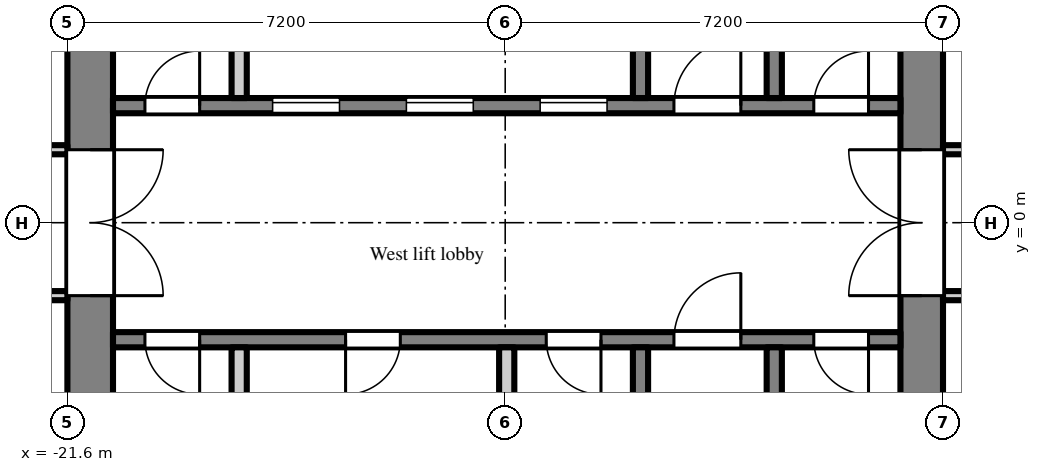
"""IFC4 building model, lengths in metres.
Left out: names, types, materials, properties, quantities, classifications, styles, units other than length and angle.
Written with IfcOpenShell. Run it as: python <this file> out.ifc"""

import sys

from ifc_helpers import new_model, si_unit, direction, frame, frame_2d, origin, place, context, subcontext, project, spatial, rectangle, extrude, element, fill, save


model = new_model("IFC4")
c1 = context("Model", 3, precision=1e-05, world=origin(), true_north=direction((0.0, 1.0)))
c2 = subcontext(c1, "Body", "Model", "MODEL_VIEW")
j1 = project(units=[si_unit("LENGTHUNIT", "METRE"), si_unit("PLANEANGLEUNIT", "RADIAN")], contexts=[c1])
p1 = place(None, origin())
s1 = spatial("IfcSite", under=j1, at=p1, CompositionType="ELEMENT")
p2 = place(p1, origin())
s2 = spatial("IfcBuilding", under=s1, at=p2, CompositionType="ELEMENT")
p3 = place(p2, frame((0.0, 0.0, 179.7)))
s3 = spatial("IfcBuildingStorey", under=s2, at=p3, CompositionType="ELEMENT", Elevation=179.7)
p4 = place(p3, frame((-7.55, -7.2, 0.0), z_axis=(0.0, 0.0, 1.0), x_axis=(0.0, 1.0, 0.0)))
e1 = element("IfcWall", 1, at=p4, inside=s3, PredefinedType="SHEAR", context=c2, shape_type="SweptSolid", body=[
    extrude(rectangle(XDim=14.4, YDim=0.7, at=frame_2d((7.2, 0.0))), origin(), (0.0, 0.0, 1.0), 2.6),
])
p5 = place(p4, frame((6.0, 0.0, 0.0)))
e2 = element("IfcOpeningElement", 2, at=p5, cuts=e1, PredefinedType="OPENING", context=c2, shape_type="SweptSolid", body=[
    extrude(rectangle(XDim=2.4, YDim=2.2, at=frame_2d((1.2, 1.1))), frame((0.0, 0.36, 0.0), z_axis=(0.0, -1.0, 0.0), x_axis=(1.0, 0.0, 0.0)), (0.0, 0.0, 1.0), 0.72),
])
p6 = place(p3, frame((-21.225, -7.2, 0.0), z_axis=(0.0, 0.0, 1.0), x_axis=(0.0, 1.0, 0.0)))
e3 = element("IfcWall", 3, at=p6, inside=s3, PredefinedType="SHEAR", context=c2, shape_type="SweptSolid", body=[
    extrude(rectangle(XDim=14.4, YDim=0.75, at=frame_2d((7.2, 0.0))), origin(), (0.0, 0.0, 1.0), 2.6),
])
p7 = place(p6, frame((6.0, 0.0, 0.0)))
e4 = element("IfcOpeningElement", 4, at=p7, cuts=e3, PredefinedType="OPENING", context=c2, shape_type="SweptSolid", body=[
    extrude(rectangle(XDim=2.4, YDim=2.2, at=frame_2d((1.2, 1.1))), frame((0.0, 0.385, 0.0), z_axis=(0.0, -1.0, 0.0), x_axis=(1.0, 0.0, 0.0)), (0.0, 0.0, 1.0), 0.77),
])
p8 = place(p3, frame((-7.9, 1.925, 0.0), z_axis=(0.0, 0.0, 1.0), x_axis=(-1.0, 0.0, 0.0)))
e5 = element("IfcWall", 5, at=p8, inside=s3, PredefinedType="SHEAR", context=c2, shape_type="SweptSolid", body=[
    extrude(rectangle(XDim=12.95, YDim=0.25, at=frame_2d((6.475, 0.0))), origin(), (0.0, 0.0, 1.0), 2.6),
])
p9 = place(p8, frame((4.825, 0.0, 0.0)))
e6 = element("IfcOpeningElement", 6, at=p9, cuts=e5, PredefinedType="OPENING", context=c2, shape_type="SweptSolid", body=[
    extrude(rectangle(XDim=1.1, YDim=2.1, at=frame_2d((0.55, 1.05))), frame((0.0, 0.135, 0.0), z_axis=(0.0, -1.0, 0.0), x_axis=(1.0, 0.0, 0.0)), (0.0, 0.0, 1.0), 0.27),
])
p10 = place(p8, frame((7.025, 0.0, 0.0)))
e7 = element("IfcOpeningElement", 7, at=p10, cuts=e5, PredefinedType="OPENING", context=c2, shape_type="SweptSolid", body=[
    extrude(rectangle(XDim=1.1, YDim=2.1, at=frame_2d((0.55, 1.05))), frame((0.0, 0.135, 0.0), z_axis=(0.0, -1.0, 0.0), x_axis=(1.0, 0.0, 0.0)), (0.0, 0.0, 1.0), 0.27),
])
p11 = place(p8, frame((9.225, 0.0, 0.0)))
e8 = element("IfcOpeningElement", 8, at=p11, cuts=e5, PredefinedType="OPENING", context=c2, shape_type="SweptSolid", body=[
    extrude(rectangle(XDim=1.1, YDim=2.1, at=frame_2d((0.55, 1.05))), frame((0.0, 0.135, 0.0), z_axis=(0.0, -1.0, 0.0), x_axis=(1.0, 0.0, 0.0)), (0.0, 0.0, 1.0), 0.27),
])
p12 = place(p8, frame((0.525, 0.0, 0.0)))
e9 = element("IfcOpeningElement", 9, at=p12, cuts=e5, PredefinedType="OPENING", context=c2, shape_type="SweptSolid", body=[
    extrude(rectangle(XDim=0.9, YDim=2.1, at=frame_2d((0.45, 1.05))), frame((0.0, 0.135, 0.0), z_axis=(0.0, -1.0, 0.0), x_axis=(1.0, 0.0, 0.0)), (0.0, 0.0, 1.0), 0.27),
])
p13 = place(p8, frame((2.625, 0.0, 0.0)))
e10 = element("IfcOpeningElement", 10, at=p13, cuts=e5, PredefinedType="OPENING", context=c2, shape_type="SweptSolid", body=[
    extrude(rectangle(XDim=1.1, YDim=2.1, at=frame_2d((0.55, 1.05))), frame((0.0, 0.135, 0.0), z_axis=(0.0, -1.0, 0.0), x_axis=(1.0, 0.0, 0.0)), (0.0, 0.0, 1.0), 0.27),
])
p14 = place(p8, frame((11.525, 0.0, 0.0)))
e11 = element("IfcOpeningElement", 11, at=p14, cuts=e5, PredefinedType="OPENING", context=c2, shape_type="SweptSolid", body=[
    extrude(rectangle(XDim=0.9, YDim=2.1, at=frame_2d((0.45, 1.05))), frame((0.0, 0.135, 0.0), z_axis=(0.0, -1.0, 0.0), x_axis=(1.0, 0.0, 0.0)), (0.0, 0.0, 1.0), 0.27),
])
p15 = place(p3, frame((-9.975, 2.05, 0.0), z_axis=(0.0, 0.0, 1.0), x_axis=(0.0, 1.0, 0.0)))
e12 = element("IfcWall", 12, at=p15, inside=s3, PredefinedType="SHEAR", context=c2, shape_type="SweptSolid", body=[
    extrude(rectangle(XDim=4.75, YDim=0.25, at=frame_2d((2.375, 0.0))), origin(), (0.0, 0.0, 1.0), 2.6),
])
p16 = place(p15, frame((2.95, 0.0, 0.0)))
e13 = element("IfcOpeningElement", 13, at=p16, cuts=e12, PredefinedType="OPENING", context=c2, shape_type="SweptSolid", body=[
    extrude(rectangle(XDim=1.1, YDim=2.1, at=frame_2d((0.55, 1.05))), frame((0.0, 0.135, 0.0), z_axis=(0.0, -1.0, 0.0), x_axis=(1.0, 0.0, 0.0)), (0.0, 0.0, 1.0), 0.27),
])
p17 = place(p3, frame((-12.175, 2.05, 0.0), z_axis=(0.0, 0.0, 1.0), x_axis=(0.0, 1.0, 0.0)))
e14 = element("IfcWall", 14, at=p17, inside=s3, PredefinedType="SHEAR", context=c2, shape_type="SweptSolid", body=[
    extrude(rectangle(XDim=4.75, YDim=0.25, at=frame_2d((2.375, 0.0))), origin(), (0.0, 0.0, 1.0), 2.6),
])
p18 = place(p17, frame((3.0, 0.0, 0.0)))
e15 = element("IfcOpeningElement", 15, at=p18, cuts=e14, PredefinedType="OPENING", context=c2, shape_type="SweptSolid", body=[
    extrude(rectangle(XDim=1.1, YDim=2.1, at=frame_2d((0.55, 1.05))), frame((0.0, 0.135, 0.0), z_axis=(0.0, -1.0, 0.0), x_axis=(1.0, 0.0, 0.0)), (0.0, 0.0, 1.0), 0.27),
])
p19 = place(p3, frame((-18.775, 2.05, 0.0), z_axis=(0.0, 0.0, 1.0), x_axis=(0.0, 1.0, 0.0)))
e16 = element("IfcWall", 16, at=p19, inside=s3, PredefinedType="PARTITIONING", context=c2, shape_type="SweptSolid", body=[
    extrude(rectangle(XDim=2.1, YDim=0.25, at=frame_2d((1.05, 0.0))), origin(), (0.0, 0.0, 1.0), 2.6),
])
p20 = place(p3, frame((-7.9, -1.925, 0.0), z_axis=(0.0, 0.0, 1.0), x_axis=(-1.0, 0.0, 0.0)))
e17 = element("IfcWall", 17, at=p20, inside=s3, PredefinedType="SHEAR", context=c2, shape_type="SweptSolid", body=[
    extrude(rectangle(XDim=12.95, YDim=0.25, at=frame_2d((6.475, 0.0))), origin(), (0.0, 0.0, 1.0), 2.6),
])
p21 = place(p20, frame((0.525, 0.0, 0.0)))
e18 = element("IfcOpeningElement", 18, at=p21, cuts=e17, PredefinedType="OPENING", context=c2, shape_type="SweptSolid", body=[
    extrude(rectangle(XDim=0.9, YDim=2.1, at=frame_2d((0.45, 1.05))), frame((0.0, 0.135, 0.0), z_axis=(0.0, -1.0, 0.0), x_axis=(1.0, 0.0, 0.0)), (0.0, 0.0, 1.0), 0.27),
])
p22 = place(p20, frame((2.625, 0.0, 0.0)))
e19 = element("IfcOpeningElement", 19, at=p22, cuts=e17, PredefinedType="OPENING", context=c2, shape_type="SweptSolid", body=[
    extrude(rectangle(XDim=1.1, YDim=2.1, at=frame_2d((0.55, 1.05))), frame((0.0, 0.135, 0.0), z_axis=(0.0, -1.0, 0.0), x_axis=(1.0, 0.0, 0.0)), (0.0, 0.0, 1.0), 0.27),
])
p23 = place(p20, frame((4.925, 0.0, 0.0)))
e20 = element("IfcOpeningElement", 20, at=p23, cuts=e17, PredefinedType="OPENING", context=c2, shape_type="SweptSolid", body=[
    extrude(rectangle(XDim=0.9, YDim=2.1, at=frame_2d((0.45, 1.05))), frame((0.0, 0.135, 0.0), z_axis=(0.0, -1.0, 0.0), x_axis=(1.0, 0.0, 0.0)), (0.0, 0.0, 1.0), 0.27),
])
p24 = place(p20, frame((8.225, 0.0, 0.0)))
e21 = element("IfcOpeningElement", 21, at=p24, cuts=e17, PredefinedType="OPENING", context=c2, shape_type="SweptSolid", body=[
    extrude(rectangle(XDim=0.9, YDim=2.1, at=frame_2d((0.45, 1.05))), frame((0.0, 0.135, 0.0), z_axis=(0.0, -1.0, 0.0), x_axis=(1.0, 0.0, 0.0)), (0.0, 0.0, 1.0), 0.27),
])
p25 = place(p20, frame((11.525, 0.0, 0.0)))
e22 = element("IfcOpeningElement", 22, at=p25, cuts=e17, PredefinedType="OPENING", context=c2, shape_type="SweptSolid", body=[
    extrude(rectangle(XDim=0.9, YDim=2.1, at=frame_2d((0.45, 1.05))), frame((0.0, 0.135, 0.0), z_axis=(0.0, -1.0, 0.0), x_axis=(1.0, 0.0, 0.0)), (0.0, 0.0, 1.0), 0.27),
])
p26 = place(p3, frame((-9.975, -2.05, 0.0), z_axis=(0.0, 0.0, 1.0), x_axis=(0.0, -1.0, 0.0)))
e23 = element("IfcWall", 23, at=p26, inside=s3, PredefinedType="SHEAR", context=c2, shape_type="SweptSolid", body=[
    extrude(rectangle(XDim=4.75, YDim=0.25, at=frame_2d((2.375, 0.0))), origin(), (0.0, 0.0, 1.0), 2.6),
])
p27 = place(p26, frame((2.95, 0.0, 0.0)))
e24 = element("IfcOpeningElement", 24, at=p27, cuts=e23, PredefinedType="OPENING", context=c2, shape_type="SweptSolid", body=[
    extrude(rectangle(XDim=1.1, YDim=2.1, at=frame_2d((0.55, 1.05))), frame((0.0, 0.135, 0.0), z_axis=(0.0, -1.0, 0.0), x_axis=(1.0, 0.0, 0.0)), (0.0, 0.0, 1.0), 0.27),
])
p28 = place(p3, frame((-12.175, -2.05, 0.0), z_axis=(0.0, 0.0, 1.0), x_axis=(0.0, -1.0, 0.0)))
e25 = element("IfcWall", 25, at=p28, inside=s3, PredefinedType="SHEAR", context=c2, shape_type="SweptSolid", body=[
    extrude(rectangle(XDim=4.75, YDim=0.25, at=frame_2d((2.375, 0.0))), origin(), (0.0, 0.0, 1.0), 2.6),
])
p29 = place(p28, frame((3.0, 0.0, 0.0)))
e26 = element("IfcOpeningElement", 26, at=p29, cuts=e25, PredefinedType="OPENING", context=c2, shape_type="SweptSolid", body=[
    extrude(rectangle(XDim=1.1, YDim=2.1, at=frame_2d((0.55, 1.05))), frame((0.0, 0.135, 0.0), z_axis=(0.0, -1.0, 0.0), x_axis=(1.0, 0.0, 0.0)), (0.0, 0.0, 1.0), 0.27),
])
for number, where, z_axis, x_axis in (
    (27, (-14.375, -2.05, 0.0), (0.0, 0.0, 1.0), (0.0, -1.0, 0.0)),
    (28, (-18.775, -2.05, 0.0), (0.0, 0.0, 1.0), (0.0, -1.0, 0.0)),
):
    element("IfcWall", number, at=place(p3, frame(where, z_axis=z_axis, x_axis=x_axis)), inside=s3, PredefinedType="PARTITIONING", context=c2, shape_type="SweptSolid", body=[
        extrude(rectangle(XDim=2.1, YDim=0.25, at=frame_2d((1.05, 0.0))), origin(), (0.0, 0.0, 1.0), 2.6),
    ])
p30 = place(p3, frame((-36.5, -1.2, 0.0), z_axis=(0.0, 0.0, 1.0), x_axis=(1.0, 0.0, 0.0)))
e29 = element("IfcWall", 29, at=p30, inside=s3, PredefinedType="PARTITIONING", context=c2, shape_type="SweptSolid", body=[
    extrude(rectangle(XDim=14.9, YDim=0.15, at=frame_2d((7.45, 0.0))), origin(), (0.0, 0.0, 1.0), 2.6),
])
p31 = place(p30, frame((13.55, 0.0, 0.0)))
e30 = element("IfcOpeningElement", 30, at=p31, cuts=e29, PredefinedType="OPENING", context=c2, shape_type="SweptSolid", body=[
    extrude(rectangle(XDim=0.9, YDim=2.1, at=frame_2d((0.45, 1.05))), frame((0.0, 0.085, 0.0), z_axis=(0.0, -1.0, 0.0), x_axis=(1.0, 0.0, 0.0)), (0.0, 0.0, 1.0), 0.17),
])
p32 = place(p30, frame((11.75, 0.0, 0.0)))
e31 = element("IfcOpeningElement", 31, at=p32, cuts=e29, PredefinedType="OPENING", context=c2, shape_type="SweptSolid", body=[
    extrude(rectangle(XDim=0.9, YDim=2.1, at=frame_2d((0.45, 1.05))), frame((0.0, 0.085, 0.0), z_axis=(0.0, -1.0, 0.0), x_axis=(1.0, 0.0, 0.0)), (0.0, 0.0, 1.0), 0.17),
])
p33 = place(p30, frame((4.41, 0.0, 0.0)))
e32 = element("IfcOpeningElement", 32, at=p33, cuts=e29, PredefinedType="OPENING", context=c2, shape_type="SweptSolid", body=[
    extrude(rectangle(XDim=1.0, YDim=2.1, at=frame_2d((0.5, 1.05))), frame((0.0, 0.085, 0.0), z_axis=(0.0, -1.0, 0.0), x_axis=(1.0, 0.0, 0.0)), (0.0, 0.0, 1.0), 0.17),
])
p34 = place(p30, frame((1.15, 0.0, 0.0)))
e33 = element("IfcOpeningElement", 33, at=p34, cuts=e29, PredefinedType="OPENING", context=c2, shape_type="SweptSolid", body=[
    extrude(rectangle(XDim=1.8, YDim=2.1, at=frame_2d((0.9, 1.05))), frame((0.0, 0.085, 0.0), z_axis=(0.0, -1.0, 0.0), x_axis=(1.0, 0.0, 0.0)), (0.0, 0.0, 1.0), 0.17),
])
p35 = place(p3, frame((-36.5, 1.2, 0.0), z_axis=(0.0, 0.0, 1.0), x_axis=(1.0, 0.0, 0.0)))
e34 = element("IfcWall", 34, at=p35, inside=s3, PredefinedType="PARTITIONING", context=c2, shape_type="SweptSolid", body=[
    extrude(rectangle(XDim=14.9, YDim=0.15, at=frame_2d((7.45, 0.0))), origin(), (0.0, 0.0, 1.0), 2.6),
])
p36 = place(p35, frame((12.65, 0.0, 0.0)))
e35 = element("IfcOpeningElement", 35, at=p36, cuts=e34, PredefinedType="OPENING", context=c2, shape_type="SweptSolid", body=[
    extrude(rectangle(XDim=0.9, YDim=2.1, at=frame_2d((0.45, 1.05))), frame((0.0, 0.085, 0.0), z_axis=(0.0, -1.0, 0.0), x_axis=(1.0, 0.0, 0.0)), (0.0, 0.0, 1.0), 0.17),
])
p37 = place(p35, frame((9.95, 0.0, 0.0)))
e36 = element("IfcOpeningElement", 36, at=p37, cuts=e34, PredefinedType="OPENING", context=c2, shape_type="SweptSolid", body=[
    extrude(rectangle(XDim=0.9, YDim=2.1, at=frame_2d((0.45, 1.05))), frame((0.0, 0.085, 0.0), z_axis=(0.0, -1.0, 0.0), x_axis=(1.0, 0.0, 0.0)), (0.0, 0.0, 1.0), 0.17),
])
p38 = place(p35, frame((8.15, 0.0, 0.0)))
e37 = element("IfcOpeningElement", 37, at=p38, cuts=e34, PredefinedType="OPENING", context=c2, shape_type="SweptSolid", body=[
    extrude(rectangle(XDim=0.9, YDim=2.1, at=frame_2d((0.45, 1.05))), frame((0.0, 0.085, 0.0), z_axis=(0.0, -1.0, 0.0), x_axis=(1.0, 0.0, 0.0)), (0.0, 0.0, 1.0), 0.17),
])
p39 = place(p35, frame((6.35, 0.0, 0.0)))
e38 = element("IfcOpeningElement", 38, at=p39, cuts=e34, PredefinedType="OPENING", context=c2, shape_type="SweptSolid", body=[
    extrude(rectangle(XDim=0.9, YDim=2.1, at=frame_2d((0.45, 1.05))), frame((0.0, 0.085, 0.0), z_axis=(0.0, -1.0, 0.0), x_axis=(1.0, 0.0, 0.0)), (0.0, 0.0, 1.0), 0.17),
])
p40 = place(p35, frame((4.55, 0.0, 0.0)))
e39 = element("IfcOpeningElement", 39, at=p40, cuts=e34, PredefinedType="OPENING", context=c2, shape_type="SweptSolid", body=[
    extrude(rectangle(XDim=0.9, YDim=2.1, at=frame_2d((0.45, 1.05))), frame((0.0, 0.085, 0.0), z_axis=(0.0, -1.0, 0.0), x_axis=(1.0, 0.0, 0.0)), (0.0, 0.0, 1.0), 0.17),
])
p41 = place(p35, frame((1.15, 0.0, 0.0)))
e40 = element("IfcOpeningElement", 40, at=p41, cuts=e34, PredefinedType="OPENING", context=c2, shape_type="SweptSolid", body=[
    extrude(rectangle(XDim=1.8, YDim=2.1, at=frame_2d((0.9, 1.05))), frame((0.0, 0.085, 0.0), z_axis=(0.0, -1.0, 0.0), x_axis=(1.0, 0.0, 0.0)), (0.0, 0.0, 1.0), 0.17),
])
p42 = place(p3, frame((-7.2, -1.2, 0.0), z_axis=(0.0, 0.0, 1.0), x_axis=(1.0, 0.0, 0.0)))
e41 = element("IfcWall", 41, at=p42, inside=s3, PredefinedType="PARTITIONING", context=c2, shape_type="SweptSolid", body=[
    extrude(rectangle(XDim=6.075, YDim=0.15, at=frame_2d((3.038, 0.0))), origin(), (0.0, 0.0, 1.0), 2.6),
])
p43 = place(p42, frame((1.05, 0.0, 0.0)))
e42 = element("IfcOpeningElement", 42, at=p43, cuts=e41, PredefinedType="OPENING", context=c2, shape_type="SweptSolid", body=[
    extrude(rectangle(XDim=0.9, YDim=2.1, at=frame_2d((0.45, 1.05))), frame((0.0, 0.085, 0.0), z_axis=(0.0, -1.0, 0.0), x_axis=(1.0, 0.0, 0.0)), (0.0, 0.0, 1.0), 0.17),
])
p44 = place(p3, frame((-7.2, 1.2, 0.0), z_axis=(0.0, 0.0, 1.0), x_axis=(1.0, 0.0, 0.0)))
e43 = element("IfcWall", 43, at=p44, inside=s3, PredefinedType="PARTITIONING", context=c2, shape_type="SweptSolid", body=[
    extrude(rectangle(XDim=6.075, YDim=0.15, at=frame_2d((3.038, 0.0))), origin(), (0.0, 0.0, 1.0), 2.6),
])
p45 = place(p44, frame((1.05, 0.0, 0.0)))
e44 = element("IfcOpeningElement", 44, at=p45, cuts=e43, PredefinedType="OPENING", context=c2, shape_type="SweptSolid", body=[
    extrude(rectangle(XDim=0.9, YDim=2.1, at=frame_2d((0.45, 1.05))), frame((0.0, 0.085, 0.0), z_axis=(0.0, -1.0, 0.0), x_axis=(1.0, 0.0, 0.0)), (0.0, 0.0, 1.0), 0.17),
])
p46 = place(p9, origin())
e45 = element("IfcDoor", 45, at=p46, inside=s3, OperationType="SLIDING_TO_LEFT", PredefinedType="DOOR", context=c2, shape_type="SweptSolid", body=[
    extrude(rectangle(XDim=1.1, YDim=2.1, at=frame_2d((0.55, 1.05))), frame((0.0, 0.025, 0.0), z_axis=(0.0, -1.0, 0.0), x_axis=(1.0, 0.0, 0.0)), (0.0, 0.0, 1.0), 0.05),
])
fill(e6, e45)
p47 = place(p10, origin())
e46 = element("IfcDoor", 46, at=p47, inside=s3, OperationType="SLIDING_TO_LEFT", PredefinedType="DOOR", context=c2, shape_type="SweptSolid", body=[
    extrude(rectangle(XDim=1.1, YDim=2.1, at=frame_2d((0.55, 1.05))), frame((0.0, 0.025, 0.0), z_axis=(0.0, -1.0, 0.0), x_axis=(1.0, 0.0, 0.0)), (0.0, 0.0, 1.0), 0.05),
])
fill(e7, e46)
p48 = place(p11, origin())
e47 = element("IfcDoor", 47, at=p48, inside=s3, OperationType="SLIDING_TO_LEFT", PredefinedType="DOOR", context=c2, shape_type="SweptSolid", body=[
    extrude(rectangle(XDim=1.1, YDim=2.1, at=frame_2d((0.55, 1.05))), frame((0.0, 0.025, 0.0), z_axis=(0.0, -1.0, 0.0), x_axis=(1.0, 0.0, 0.0)), (0.0, 0.0, 1.0), 0.05),
])
fill(e8, e47)
p49 = place(p12, frame((0.9, 0.0, 0.0), z_axis=(0.0, 0.0, 1.0), x_axis=(-1.0, 0.0, 0.0)))
e48 = element("IfcDoor", 48, at=p49, inside=s3, OperationType="SINGLE_SWING_RIGHT", PredefinedType="DOOR", context=c2, shape_type="SweptSolid", body=[
    extrude(rectangle(XDim=0.9, YDim=2.1, at=frame_2d((0.45, 1.05))), frame((0.0, 0.025, 0.0), z_axis=(0.0, -1.0, 0.0), x_axis=(1.0, 0.0, 0.0)), (0.0, 0.0, 1.0), 0.05),
])
fill(e9, e48)
p50 = place(p21, origin())
e49 = element("IfcDoor", 49, at=p50, inside=s3, OperationType="SINGLE_SWING_LEFT", PredefinedType="DOOR", context=c2, shape_type="SweptSolid", body=[
    extrude(rectangle(XDim=0.9, YDim=2.1, at=frame_2d((0.45, 1.05))), frame((0.0, 0.025, 0.0), z_axis=(0.0, -1.0, 0.0), x_axis=(1.0, 0.0, 0.0)), (0.0, 0.0, 1.0), 0.05),
])
fill(e18, e49)
p51 = place(p13, frame((1.1, 0.0, 0.0), z_axis=(0.0, 0.0, 1.0), x_axis=(-1.0, 0.0, 0.0)))
e50 = element("IfcDoor", 50, at=p51, inside=s3, OperationType="SINGLE_SWING_RIGHT", PredefinedType="DOOR", context=c2, shape_type="SweptSolid", body=[
    extrude(rectangle(XDim=1.1, YDim=2.1, at=frame_2d((0.55, 1.05))), frame((0.0, 0.025, 0.0), z_axis=(0.0, -1.0, 0.0), x_axis=(1.0, 0.0, 0.0)), (0.0, 0.0, 1.0), 0.05),
])
fill(e10, e50)
p52 = place(p22, frame((1.1, 0.0, 0.0), z_axis=(0.0, 0.0, 1.0), x_axis=(-1.0, 0.0, 0.0)))
e51 = element("IfcDoor", 51, at=p52, inside=s3, OperationType="SINGLE_SWING_RIGHT", PredefinedType="DOOR", context=c2, shape_type="SweptSolid", body=[
    extrude(rectangle(XDim=1.1, YDim=2.1, at=frame_2d((0.55, 1.05))), frame((0.0, 0.025, 0.0), z_axis=(0.0, -1.0, 0.0), x_axis=(1.0, 0.0, 0.0)), (0.0, 0.0, 1.0), 0.05),
])
fill(e19, e51)
p53 = place(p5, origin())
e52 = element("IfcDoor", 52, at=p53, inside=s3, OperationType="DOUBLE_DOOR_DOUBLE_SWING", PredefinedType="DOOR", context=c2, shape_type="SweptSolid", body=[
    extrude(rectangle(XDim=2.4, YDim=2.2, at=frame_2d((1.2, 1.1))), frame((0.0, 0.025, 0.0), z_axis=(0.0, -1.0, 0.0), x_axis=(1.0, 0.0, 0.0)), (0.0, 0.0, 1.0), 0.05),
])
fill(e2, e52)
p54 = place(p7, frame((2.4, 0.0, 0.0), z_axis=(0.0, 0.0, 1.0), x_axis=(-1.0, 0.0, 0.0)))
e53 = element("IfcDoor", 53, at=p54, inside=s3, OperationType="DOUBLE_DOOR_DOUBLE_SWING", PredefinedType="DOOR", context=c2, shape_type="SweptSolid", body=[
    extrude(rectangle(XDim=2.4, YDim=2.2, at=frame_2d((1.2, 1.1))), frame((0.0, 0.025, 0.0), z_axis=(0.0, -1.0, 0.0), x_axis=(1.0, 0.0, 0.0)), (0.0, 0.0, 1.0), 0.05),
])
fill(e4, e53)
p55 = place(p14, frame((0.9, 0.0, 0.0), z_axis=(0.0, 0.0, 1.0), x_axis=(-1.0, 0.0, 0.0)))
e54 = element("IfcDoor", 54, at=p55, inside=s3, OperationType="SINGLE_SWING_RIGHT", PredefinedType="DOOR", context=c2, shape_type="SweptSolid", body=[
    extrude(rectangle(XDim=0.9, YDim=2.1, at=frame_2d((0.45, 1.05))), frame((0.0, 0.025, 0.0), z_axis=(0.0, -1.0, 0.0), x_axis=(1.0, 0.0, 0.0)), (0.0, 0.0, 1.0), 0.05),
])
fill(e11, e54)
p56 = place(p23, origin())
e55 = element("IfcDoor", 55, at=p56, inside=s3, OperationType="SINGLE_SWING_LEFT", PredefinedType="DOOR", context=c2, shape_type="SweptSolid", body=[
    extrude(rectangle(XDim=0.9, YDim=2.1, at=frame_2d((0.45, 1.05))), frame((0.0, 0.025, 0.0), z_axis=(0.0, -1.0, 0.0), x_axis=(1.0, 0.0, 0.0)), (0.0, 0.0, 1.0), 0.05),
])
fill(e20, e55)
p57 = place(p24, origin())
e56 = element("IfcDoor", 56, at=p57, inside=s3, OperationType="SINGLE_SWING_RIGHT", PredefinedType="DOOR", context=c2, shape_type="SweptSolid", body=[
    extrude(rectangle(XDim=0.9, YDim=2.1, at=frame_2d((0.45, 1.05))), frame((0.0, 0.025, 0.0), z_axis=(0.0, -1.0, 0.0), x_axis=(1.0, 0.0, 0.0)), (0.0, 0.0, 1.0), 0.05),
])
fill(e21, e56)
p58 = place(p25, origin())
e57 = element("IfcDoor", 57, at=p58, inside=s3, OperationType="SINGLE_SWING_LEFT", PredefinedType="DOOR", context=c2, shape_type="SweptSolid", body=[
    extrude(rectangle(XDim=0.9, YDim=2.1, at=frame_2d((0.45, 1.05))), frame((0.0, 0.025, 0.0), z_axis=(0.0, -1.0, 0.0), x_axis=(1.0, 0.0, 0.0)), (0.0, 0.0, 1.0), 0.05),
])
fill(e22, e57)
save(model, sys.argv[1])
